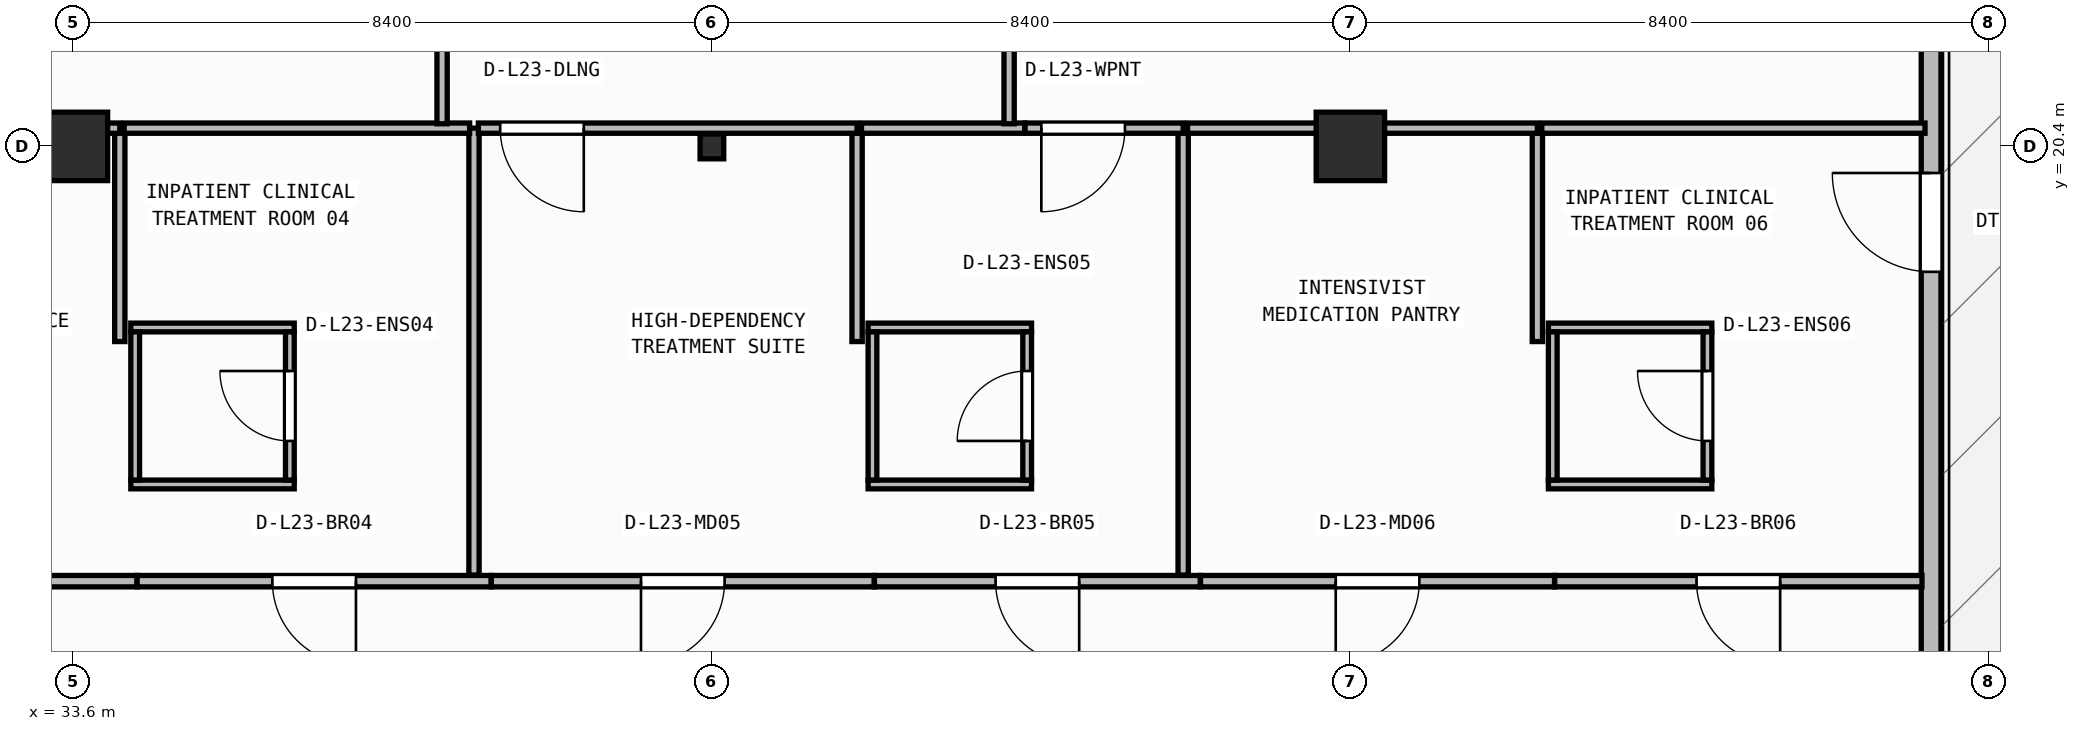
"""IFC4 building model, lengths in metres.
Left out: names, types, materials, properties, quantities, classifications, styles, units other than length and angle.
Written with IfcOpenShell. Run it as: python <this file> out.ifc"""

import sys

from ifc_helpers import new_model, si_unit, direction, frame, frame_2d, origin, origin_2d, place, context, subcontext, project, spatial, rectangle, i_section, extrude, element, fill, save


model = new_model("IFC4")
c1 = context("Model", 3, precision=1e-05, world=origin(), true_north=direction((0.0, 1.0)))
c2 = subcontext(c1, "Body", "Model", "MODEL_VIEW")
j1 = project(units=[si_unit("LENGTHUNIT", "METRE"), si_unit("PLANEANGLEUNIT", "RADIAN")], contexts=[c1])
p1 = place(None, origin())
s1 = spatial("IfcSite", under=j1, at=p1, CompositionType="ELEMENT")
p2 = place(p1, origin())
s2 = spatial("IfcBuilding", under=s1, at=p2, CompositionType="ELEMENT")
p3 = place(p2, frame((0.0, 0.0, 93.6)))
s3 = spatial("IfcBuildingStorey", under=s2, at=p3, CompositionType="ELEMENT", Elevation=93.6)
p4 = place(p3, frame((33.6, 20.4, 0.0), z_axis=(0.0, 0.0, 1.0), x_axis=(1.0, 0.0, 0.0)))
e1 = element("IfcColumn", 1, at=p4, inside=s3, PredefinedType="COLUMN", context=c2, shape_type="SweptSolid", body=[
    extrude(rectangle(XDim=0.9, YDim=0.9, at=origin_2d()), origin(), (0.0, 0.0, 1.0), 3.95),
])
p5 = place(p3, frame((42.0, 20.4, 0.0), z_axis=(0.0, 0.0, 1.0), x_axis=(1.0, 0.0, 0.0)))
e2 = element("IfcColumn", 2, at=p5, inside=s3, PredefinedType="COLUMN", context=c2, shape_type="SweptSolid", body=[
    extrude(i_section(OverallWidth=0.311, OverallDepth=0.327, WebThickness=0.016, FlangeThickness=0.025, FilletRadius=0.017, at=origin_2d()), origin(), (0.0, 0.0, 1.0), 3.95),
])
p6 = place(p3, frame((50.4, 20.4, 0.0), z_axis=(0.0, 0.0, 1.0), x_axis=(1.0, 0.0, 0.0)))
e3 = element("IfcColumn", 3, at=p6, inside=s3, PredefinedType="COLUMN", context=c2, shape_type="SweptSolid", body=[
    extrude(rectangle(XDim=0.9, YDim=0.9, at=origin_2d()), origin(), (0.0, 0.0, 1.0), 3.95),
])
p7 = place(p3, frame((58.04, 7.16, 0.0), z_axis=(0.0, 0.0, 1.0), x_axis=(0.0, 1.0, 0.0)))
e4 = element("IfcWall", 4, at=p7, inside=s3, PredefinedType="STANDARD", context=c2, shape_type="SweptSolid", body=[
    extrude(rectangle(XDim=24.48, YDim=0.26, at=frame_2d((12.24, 0.0))), origin(), (0.0, 0.0, 1.0), 3.67),
])
p8 = place(p7, frame((11.59, 0.0, 0.0)))
e5 = element("IfcOpeningElement", 5, at=p8, cuts=e4, PredefinedType="OPENING", context=c2, shape_type="SweptSolid", body=[
    extrude(rectangle(XDim=1.3, YDim=2.15, at=frame_2d((0.65, 1.075))), frame((0.0, 0.14, 0.0), z_axis=(0.0, -1.0, 0.0), x_axis=(1.0, 0.0, 0.0)), (0.0, 0.0, 1.0), 0.28),
])
p9 = place(p3, frame((34.355, 15.952, 0.0), z_axis=(0.0, 0.0, 1.0), x_axis=(1.0, 0.0, 0.0)))
e6 = element("IfcWall", 6, at=p9, inside=s3, PredefinedType="PARTITIONING", context=c2, shape_type="SweptSolid", body=[
    extrude(rectangle(XDim=2.15, YDim=0.115, at=frame_2d((1.075, 0.0))), origin(), (0.0, 0.0, 1.0), 3.438),
])
p10 = place(p3, frame((34.355, 18.018, 0.0), z_axis=(0.0, 0.0, 1.0), x_axis=(1.0, 0.0, 0.0)))
e7 = element("IfcWall", 7, at=p10, inside=s3, PredefinedType="PARTITIONING", context=c2, shape_type="SweptSolid", body=[
    extrude(rectangle(XDim=2.15, YDim=0.115, at=frame_2d((1.075, 0.0))), origin(), (0.0, 0.0, 1.0), 3.67),
])
p11 = place(p3, frame((34.413, 16.01, 0.0), z_axis=(0.0, 0.0, 1.0), x_axis=(0.0, 1.0, 0.0)))
e8 = element("IfcWall", 8, at=p11, inside=s3, PredefinedType="PARTITIONING", context=c2, shape_type="SweptSolid", body=[
    extrude(rectangle(XDim=1.95, YDim=0.115, at=frame_2d((0.975, 0.0))), origin(), (0.0, 0.0, 1.0), 3.67),
])
p12 = place(p3, frame((36.448, 16.01, 0.0), z_axis=(0.0, 0.0, 1.0), x_axis=(0.0, 1.0, 0.0)))
e9 = element("IfcWall", 9, at=p12, inside=s3, PredefinedType="PARTITIONING", context=c2, shape_type="SweptSolid", body=[
    extrude(rectangle(XDim=1.95, YDim=0.115, at=frame_2d((0.975, 0.0))), origin(), (0.0, 0.0, 1.0), 3.67),
])
p13 = place(p12, frame((0.515, 0.0, 0.0)))
e10 = element("IfcOpeningElement", 10, at=p13, cuts=e9, PredefinedType="OPENING", context=c2, shape_type="SweptSolid", body=[
    extrude(rectangle(XDim=0.92, YDim=2.1, at=frame_2d((0.46, 1.05))), frame((0.0, 0.067, 0.0), z_axis=(0.0, -1.0, 0.0), x_axis=(1.0, 0.0, 0.0)), (0.0, 0.0, 1.0), 0.135),
])
p14 = place(p3, frame((44.055, 15.952, 0.0), z_axis=(0.0, 0.0, 1.0), x_axis=(1.0, 0.0, 0.0)))
e11 = element("IfcWall", 11, at=p14, inside=s3, PredefinedType="PARTITIONING", context=c2, shape_type="SweptSolid", body=[
    extrude(rectangle(XDim=2.15, YDim=0.115, at=frame_2d((1.075, 0.0))), origin(), (0.0, 0.0, 1.0), 3.438),
])
p15 = place(p3, frame((44.055, 18.018, 0.0), z_axis=(0.0, 0.0, 1.0), x_axis=(1.0, 0.0, 0.0)))
e12 = element("IfcWall", 12, at=p15, inside=s3, PredefinedType="PARTITIONING", context=c2, shape_type="SweptSolid", body=[
    extrude(rectangle(XDim=2.15, YDim=0.115, at=frame_2d((1.075, 0.0))), origin(), (0.0, 0.0, 1.0), 3.67),
])
p16 = place(p3, frame((44.113, 16.01, 0.0), z_axis=(0.0, 0.0, 1.0), x_axis=(0.0, 1.0, 0.0)))
e13 = element("IfcWall", 13, at=p16, inside=s3, PredefinedType="PARTITIONING", context=c2, shape_type="SweptSolid", body=[
    extrude(rectangle(XDim=1.95, YDim=0.115, at=frame_2d((0.975, 0.0))), origin(), (0.0, 0.0, 1.0), 3.67),
])
p17 = place(p3, frame((46.147, 16.01, 0.0), z_axis=(0.0, 0.0, 1.0), x_axis=(0.0, 1.0, 0.0)))
e14 = element("IfcWall", 14, at=p17, inside=s3, PredefinedType="PARTITIONING", context=c2, shape_type="SweptSolid", body=[
    extrude(rectangle(XDim=1.95, YDim=0.115, at=frame_2d((0.975, 0.0))), origin(), (0.0, 0.0, 1.0), 3.67),
])
p18 = place(p17, frame((0.515, 0.0, 0.0)))
e15 = element("IfcOpeningElement", 15, at=p18, cuts=e14, PredefinedType="OPENING", context=c2, shape_type="SweptSolid", body=[
    extrude(rectangle(XDim=0.92, YDim=2.1, at=frame_2d((0.46, 1.05))), frame((0.0, 0.067, 0.0), z_axis=(0.0, -1.0, 0.0), x_axis=(1.0, 0.0, 0.0)), (0.0, 0.0, 1.0), 0.135),
])
for number, where, z_axis, x_axis in (
    (16, (53.005, 15.952, 0.0), (0.0, 0.0, 1.0), (1.0, 0.0, 0.0)),
    (17, (53.005, 18.018, 0.0), (0.0, 0.0, 1.0), (1.0, 0.0, 0.0)),
):
    element("IfcWall", number, at=place(p3, frame(where, z_axis=z_axis, x_axis=x_axis)), inside=s3, PredefinedType="PARTITIONING", context=c2, shape_type="SweptSolid", body=[
        extrude(rectangle(XDim=2.15, YDim=0.115, at=frame_2d((1.075, 0.0))), origin(), (0.0, 0.0, 1.0), 3.67),
    ])
p19 = place(p3, frame((53.062, 16.01, 0.0), z_axis=(0.0, 0.0, 1.0), x_axis=(0.0, 1.0, 0.0)))
e18 = element("IfcWall", 18, at=p19, inside=s3, PredefinedType="PARTITIONING", context=c2, shape_type="SweptSolid", body=[
    extrude(rectangle(XDim=1.95, YDim=0.115, at=frame_2d((0.975, 0.0))), origin(), (0.0, 0.0, 1.0), 3.67),
])
p20 = place(p3, frame((55.097, 16.01, 0.0), z_axis=(0.0, 0.0, 1.0), x_axis=(0.0, 1.0, 0.0)))
e19 = element("IfcWall", 19, at=p20, inside=s3, PredefinedType="PARTITIONING", context=c2, shape_type="SweptSolid", body=[
    extrude(rectangle(XDim=1.95, YDim=0.115, at=frame_2d((0.975, 0.0))), origin(), (0.0, 0.0, 1.0), 3.67),
])
p21 = place(p20, frame((0.515, 0.0, 0.0)))
e20 = element("IfcOpeningElement", 20, at=p21, cuts=e19, PredefinedType="OPENING", context=c2, shape_type="SweptSolid", body=[
    extrude(rectangle(XDim=0.92, YDim=2.1, at=frame_2d((0.46, 1.05))), frame((0.0, 0.067, 0.0), z_axis=(0.0, -1.0, 0.0), x_axis=(1.0, 0.0, 0.0)), (0.0, 0.0, 1.0), 0.135),
])
p22 = place(p3, frame((34.436, 14.68, 0.0), z_axis=(0.0, 0.0, 1.0), x_axis=(-1.0, 0.0, 0.0)))
e21 = element("IfcWall", 21, at=p22, inside=s3, PredefinedType="PARTITIONING", context=c2, shape_type="SweptSolid", body=[
    extrude(rectangle(XDim=4.682, YDim=0.15, at=frame_2d((2.341, 0.0))), origin(), (0.0, 0.0, 1.0), 3.67),
])
p23 = place(p22, frame((1.791, 0.0, 0.0)))
e22 = element("IfcOpeningElement", 22, at=p23, cuts=e21, PredefinedType="OPENING", context=c2, shape_type="SweptSolid", body=[
    extrude(rectangle(XDim=1.1, YDim=2.1, at=frame_2d((0.55, 1.05))), frame((0.0, 0.085, 0.0), z_axis=(0.0, -1.0, 0.0), x_axis=(1.0, 0.0, 0.0)), (0.0, 0.0, 1.0), 0.17),
])
p24 = place(p3, frame((39.096, 14.68, 0.0), z_axis=(0.0, 0.0, 1.0), x_axis=(-1.0, 0.0, 0.0)))
e23 = element("IfcWall", 23, at=p24, inside=s3, PredefinedType="PARTITIONING", context=c2, shape_type="SweptSolid", body=[
    extrude(rectangle(XDim=4.658, YDim=0.15, at=frame_2d((2.329, 0.0))), origin(), (0.0, 0.0, 1.0), 3.67),
])
p25 = place(p24, frame((1.779, 0.0, 0.0)))
e24 = element("IfcOpeningElement", 24, at=p25, cuts=e23, PredefinedType="OPENING", context=c2, shape_type="SweptSolid", body=[
    extrude(rectangle(XDim=1.1, YDim=2.1, at=frame_2d((0.55, 1.05))), frame((0.0, 0.085, 0.0), z_axis=(0.0, -1.0, 0.0), x_axis=(1.0, 0.0, 0.0)), (0.0, 0.0, 1.0), 0.17),
])
p26 = place(p3, frame((44.136, 14.68, 0.0), z_axis=(0.0, 0.0, 1.0), x_axis=(-1.0, 0.0, 0.0)))
e25 = element("IfcWall", 25, at=p26, inside=s3, PredefinedType="PARTITIONING", context=c2, shape_type="SweptSolid", body=[
    extrude(rectangle(XDim=5.038, YDim=0.15, at=frame_2d((2.519, 0.0))), origin(), (0.0, 0.0, 1.0), 3.67),
])
p27 = place(p26, frame((1.969, 0.0, 0.0)))
e26 = element("IfcOpeningElement", 26, at=p27, cuts=e25, PredefinedType="OPENING", context=c2, shape_type="SweptSolid", body=[
    extrude(rectangle(XDim=1.1, YDim=2.1, at=frame_2d((0.55, 1.05))), frame((0.0, 0.085, 0.0), z_axis=(0.0, -1.0, 0.0), x_axis=(1.0, 0.0, 0.0)), (0.0, 0.0, 1.0), 0.17),
])
p28 = place(p3, frame((48.426, 14.68, 0.0), z_axis=(0.0, 0.0, 1.0), x_axis=(-1.0, 0.0, 0.0)))
e27 = element("IfcWall", 27, at=p28, inside=s3, PredefinedType="PARTITIONING", context=c2, shape_type="SweptSolid", body=[
    extrude(rectangle(XDim=4.288, YDim=0.15, at=frame_2d((2.144, 0.0))), origin(), (0.0, 0.0, 1.0), 3.67),
])
p29 = place(p28, frame((1.594, 0.0, 0.0)))
e28 = element("IfcOpeningElement", 28, at=p29, cuts=e27, PredefinedType="OPENING", context=c2, shape_type="SweptSolid", body=[
    extrude(rectangle(XDim=1.1, YDim=2.1, at=frame_2d((0.55, 1.05))), frame((0.0, 0.085, 0.0), z_axis=(0.0, -1.0, 0.0), x_axis=(1.0, 0.0, 0.0)), (0.0, 0.0, 1.0), 0.17),
])
p30 = place(p3, frame((53.086, 14.68, 0.0), z_axis=(0.0, 0.0, 1.0), x_axis=(-1.0, 0.0, 0.0)))
e29 = element("IfcWall", 29, at=p30, inside=s3, PredefinedType="PARTITIONING", context=c2, shape_type="SweptSolid", body=[
    extrude(rectangle(XDim=4.658, YDim=0.15, at=frame_2d((2.329, 0.0))), origin(), (0.0, 0.0, 1.0), 3.67),
])
p31 = place(p30, frame((1.779, 0.0, 0.0)))
e30 = element("IfcOpeningElement", 30, at=p31, cuts=e29, PredefinedType="OPENING", context=c2, shape_type="SweptSolid", body=[
    extrude(rectangle(XDim=1.1, YDim=2.1, at=frame_2d((0.55, 1.05))), frame((0.0, 0.085, 0.0), z_axis=(0.0, -1.0, 0.0), x_axis=(1.0, 0.0, 0.0)), (0.0, 0.0, 1.0), 0.17),
])
p32 = place(p3, frame((57.92, 14.68, 0.0), z_axis=(0.0, 0.0, 1.0), x_axis=(-1.0, 0.0, 0.0)))
e31 = element("IfcWall", 31, at=p32, inside=s3, PredefinedType="PARTITIONING", context=c2, shape_type="SweptSolid", body=[
    extrude(rectangle(XDim=4.832, YDim=0.15, at=frame_2d((2.416, 0.0))), origin(), (0.0, 0.0, 1.0), 3.67),
])
p33 = place(p32, frame((1.866, 0.0, 0.0)))
e32 = element("IfcOpeningElement", 32, at=p33, cuts=e31, PredefinedType="OPENING", context=c2, shape_type="SweptSolid", body=[
    extrude(rectangle(XDim=1.1, YDim=2.1, at=frame_2d((0.55, 1.05))), frame((0.0, 0.085, 0.0), z_axis=(0.0, -1.0, 0.0), x_axis=(1.0, 0.0, 0.0)), (0.0, 0.0, 1.0), 0.17),
])
p34 = place(p3, frame((34.21, 17.833, 0.0), z_axis=(0.0, 0.0, 1.0), x_axis=(0.0, 1.0, 0.0)))
e33 = element("IfcWall", 33, at=p34, inside=s3, PredefinedType="PARTITIONING", context=c2, shape_type="SweptSolid", body=[
    extrude(rectangle(XDim=2.807, YDim=0.135, at=frame_2d((1.404, 0.0))), origin(), (0.0, 0.0, 1.0), 3.67),
])
p35 = place(p3, frame((34.21, 20.64, 0.0), z_axis=(0.0, 0.0, 1.0), x_axis=(-1.0, 0.0, 0.0)))
e34 = element("IfcWall", 34, at=p35, inside=s3, PredefinedType="PARTITIONING", context=c2, shape_type="SweptSolid", body=[
    extrude(rectangle(XDim=4.245, YDim=0.135, at=frame_2d((2.123, 0.0))), origin(), (0.0, 0.0, 1.0), 3.033),
])
p36 = place(p3, frame((38.87, 14.76, 0.0), z_axis=(0.0, 0.0, 1.0), x_axis=(0.0, 1.0, 0.0)))
e35 = element("IfcWall", 35, at=p36, inside=s3, PredefinedType="PARTITIONING", context=c2, shape_type="SweptSolid", body=[
    extrude(rectangle(XDim=5.88, YDim=0.135, at=frame_2d((2.94, 0.0))), origin(), (0.0, 0.0, 1.0), 3.67),
])
p37 = place(p3, frame((38.812, 20.64, 0.0), z_axis=(0.0, 0.0, 1.0), x_axis=(-1.0, 0.0, 0.0)))
e36 = element("IfcWall", 36, at=p37, inside=s3, PredefinedType="PARTITIONING", context=c2, shape_type="SweptSolid", body=[
    extrude(rectangle(XDim=4.545, YDim=0.135, at=frame_2d((2.272, 0.0))), origin(), (0.0, 0.0, 1.0), 3.033),
])
p38 = place(p3, frame((43.91, 17.833, 0.0), z_axis=(0.0, 0.0, 1.0), x_axis=(0.0, 1.0, 0.0)))
e37 = element("IfcWall", 37, at=p38, inside=s3, PredefinedType="PARTITIONING", context=c2, shape_type="SweptSolid", body=[
    extrude(rectangle(XDim=2.807, YDim=0.135, at=frame_2d((1.404, 0.0))), origin(), (0.0, 0.0, 1.0), 3.67),
])
p39 = place(p3, frame((43.91, 20.64, 0.0), z_axis=(0.0, 0.0, 1.0), x_axis=(-1.0, 0.0, 0.0)))
e38 = element("IfcWall", 38, at=p39, inside=s3, PredefinedType="PARTITIONING", context=c2, shape_type="SweptSolid", body=[
    extrude(rectangle(XDim=4.982, YDim=0.135, at=frame_2d((2.491, 0.0))), origin(), (0.0, 0.0, 1.0), 3.033),
])
p40 = place(p39, frame((3.595, 0.0, 0.0)))
e39 = element("IfcOpeningElement", 39, at=p40, cuts=e38, PredefinedType="OPENING", context=c2, shape_type="SweptSolid", body=[
    extrude(rectangle(XDim=1.1, YDim=2.1, at=frame_2d((0.55, 1.05))), frame((0.0, 0.077, 0.0), z_axis=(0.0, -1.0, 0.0), x_axis=(1.0, 0.0, 0.0)), (0.0, 0.0, 1.0), 0.155),
])
p41 = place(p3, frame((48.2, 14.76, 0.0), z_axis=(0.0, 0.0, 1.0), x_axis=(0.0, 1.0, 0.0)))
e40 = element("IfcWall", 40, at=p41, inside=s3, PredefinedType="PARTITIONING", context=c2, shape_type="SweptSolid", body=[
    extrude(rectangle(XDim=5.88, YDim=0.135, at=frame_2d((2.94, 0.0))), origin(), (0.0, 0.0, 1.0), 3.67),
])
p42 = place(p3, frame((46.117, 20.64, 0.0), z_axis=(0.0, 0.0, 1.0), x_axis=(-1.0, 0.0, 0.0)))
e41 = element("IfcWall", 41, at=p42, inside=s3, PredefinedType="PARTITIONING", context=c2, shape_type="SweptSolid", body=[
    extrude(rectangle(XDim=2.15, YDim=0.135, at=frame_2d((1.075, 0.0))), origin(), (0.0, 0.0, 1.0), 3.033),
])
p43 = place(p3, frame((48.2, 20.64, 0.0), z_axis=(0.0, 0.0, 1.0), x_axis=(-1.0, 0.0, 0.0)))
e42 = element("IfcWall", 42, at=p43, inside=s3, PredefinedType="PARTITIONING", context=c2, shape_type="SweptSolid", body=[
    extrude(rectangle(XDim=2.081, YDim=0.135, at=frame_2d((1.04, 0.0))), origin(), (0.0, 0.0, 1.0), 3.033),
])
p44 = place(p43, frame((0.766, 0.0, 0.0)))
e43 = element("IfcOpeningElement", 43, at=p44, cuts=e42, PredefinedType="OPENING", context=c2, shape_type="SweptSolid", body=[
    extrude(rectangle(XDim=1.1, YDim=2.1, at=frame_2d((0.55, 1.05))), frame((0.0, 0.077, 0.0), z_axis=(0.0, -1.0, 0.0), x_axis=(1.0, 0.0, 0.0)), (0.0, 0.0, 1.0), 0.155),
])
p45 = place(p3, frame((52.86, 17.833, 0.0), z_axis=(0.0, 0.0, 1.0), x_axis=(0.0, 1.0, 0.0)))
e44 = element("IfcWall", 44, at=p45, inside=s3, PredefinedType="PARTITIONING", context=c2, shape_type="SweptSolid", body=[
    extrude(rectangle(XDim=2.807, YDim=0.135, at=frame_2d((1.404, 0.0))), origin(), (0.0, 0.0, 1.0), 3.67),
])
p46 = place(p3, frame((52.86, 20.64, 0.0), z_axis=(0.0, 0.0, 1.0), x_axis=(-1.0, 0.0, 0.0)))
e45 = element("IfcWall", 45, at=p46, inside=s3, PredefinedType="PARTITIONING", context=c2, shape_type="SweptSolid", body=[
    extrude(rectangle(XDim=4.603, YDim=0.135, at=frame_2d((2.301, 0.0))), origin(), (0.0, 0.0, 1.0), 3.033),
])
p47 = place(p3, frame((57.96, 20.64, 0.0), z_axis=(0.0, 0.0, 1.0), x_axis=(-1.0, 0.0, 0.0)))
e46 = element("IfcWall", 46, at=p47, inside=s3, PredefinedType="PARTITIONING", context=c2, shape_type="SweptSolid", body=[
    extrude(rectangle(XDim=5.042, YDim=0.135, at=frame_2d((2.521, 0.0))), origin(), (0.0, 0.0, 1.0), 3.67),
])
for number, where, z_axis, x_axis in (
    (47, (38.45, 20.698, 0.0), (0.0, 0.0, 1.0), (0.0, 1.0, 0.0)),
    (48, (45.91, 20.698, 0.0), (0.0, 0.0, 1.0), (0.0, 1.0, 0.0)),
):
    element("IfcWall", number, at=place(p3, frame(where, z_axis=z_axis, x_axis=x_axis)), inside=s3, PredefinedType="PARTITIONING", context=c2, shape_type="SweptSolid", body=[
        extrude(rectangle(XDim=6.442, YDim=0.135, at=frame_2d((3.221, 0.0))), origin(), (0.0, 0.0, 1.0), 3.67),
    ])
p48 = place(p8, origin())
e49 = element("IfcDoor", 49, at=p48, inside=s3, OperationType="SINGLE_SWING_RIGHT", PredefinedType="DOOR", context=c2, shape_type="SweptSolid", body=[
    extrude(rectangle(XDim=1.3, YDim=2.15, at=frame_2d((0.65, 1.075))), frame((0.0, 0.025, 0.0), z_axis=(0.0, -1.0, 0.0), x_axis=(1.0, 0.0, 0.0)), (0.0, 0.0, 1.0), 0.05),
])
fill(e5, e49)
p49 = place(p13, origin())
e50 = element("IfcDoor", 50, at=p49, inside=s3, OperationType="SINGLE_SWING_RIGHT", PredefinedType="DOOR", context=c2, shape_type="SweptSolid", body=[
    extrude(rectangle(XDim=0.92, YDim=2.1, at=frame_2d((0.46, 1.05))), frame((0.0, 0.025, 0.0), z_axis=(0.0, -1.0, 0.0), x_axis=(1.0, 0.0, 0.0)), (0.0, 0.0, 1.0), 0.05),
])
fill(e10, e50)
p50 = place(p18, origin())
e51 = element("IfcDoor", 51, at=p50, inside=s3, OperationType="SINGLE_SWING_LEFT", PredefinedType="DOOR", context=c2, shape_type="SweptSolid", body=[
    extrude(rectangle(XDim=0.92, YDim=2.1, at=frame_2d((0.46, 1.05))), frame((0.0, 0.025, 0.0), z_axis=(0.0, -1.0, 0.0), x_axis=(1.0, 0.0, 0.0)), (0.0, 0.0, 1.0), 0.05),
])
fill(e15, e51)
p51 = place(p21, origin())
e52 = element("IfcDoor", 52, at=p51, inside=s3, OperationType="SINGLE_SWING_RIGHT", PredefinedType="DOOR", context=c2, shape_type="SweptSolid", body=[
    extrude(rectangle(XDim=0.92, YDim=2.1, at=frame_2d((0.46, 1.05))), frame((0.0, 0.025, 0.0), z_axis=(0.0, -1.0, 0.0), x_axis=(1.0, 0.0, 0.0)), (0.0, 0.0, 1.0), 0.05),
])
fill(e20, e52)
p52 = place(p25, origin())
e53 = element("IfcDoor", 53, at=p52, inside=s3, OperationType="SINGLE_SWING_LEFT", PredefinedType="DOOR", context=c2, shape_type="SweptSolid", body=[
    extrude(rectangle(XDim=1.1, YDim=2.1, at=frame_2d((0.55, 1.05))), frame((0.0, 0.025, 0.0), z_axis=(0.0, -1.0, 0.0), x_axis=(1.0, 0.0, 0.0)), (0.0, 0.0, 1.0), 0.05),
])
fill(e24, e53)
p53 = place(p27, origin())
e54 = element("IfcDoor", 54, at=p53, inside=s3, OperationType="SINGLE_SWING_RIGHT", PredefinedType="DOOR", context=c2, shape_type="SweptSolid", body=[
    extrude(rectangle(XDim=1.1, YDim=2.1, at=frame_2d((0.55, 1.05))), frame((0.0, 0.025, 0.0), z_axis=(0.0, -1.0, 0.0), x_axis=(1.0, 0.0, 0.0)), (0.0, 0.0, 1.0), 0.05),
])
fill(e26, e54)
p54 = place(p29, origin())
e55 = element("IfcDoor", 55, at=p54, inside=s3, OperationType="SINGLE_SWING_LEFT", PredefinedType="DOOR", context=c2, shape_type="SweptSolid", body=[
    extrude(rectangle(XDim=1.1, YDim=2.1, at=frame_2d((0.55, 1.05))), frame((0.0, 0.025, 0.0), z_axis=(0.0, -1.0, 0.0), x_axis=(1.0, 0.0, 0.0)), (0.0, 0.0, 1.0), 0.05),
])
fill(e28, e55)
p55 = place(p31, origin())
e56 = element("IfcDoor", 56, at=p55, inside=s3, OperationType="SINGLE_SWING_RIGHT", PredefinedType="DOOR", context=c2, shape_type="SweptSolid", body=[
    extrude(rectangle(XDim=1.1, YDim=2.1, at=frame_2d((0.55, 1.05))), frame((0.0, 0.025, 0.0), z_axis=(0.0, -1.0, 0.0), x_axis=(1.0, 0.0, 0.0)), (0.0, 0.0, 1.0), 0.05),
])
fill(e30, e56)
p56 = place(p33, origin())
e57 = element("IfcDoor", 57, at=p56, inside=s3, OperationType="SINGLE_SWING_LEFT", PredefinedType="DOOR", context=c2, shape_type="SweptSolid", body=[
    extrude(rectangle(XDim=1.1, YDim=2.1, at=frame_2d((0.55, 1.05))), frame((0.0, 0.025, 0.0), z_axis=(0.0, -1.0, 0.0), x_axis=(1.0, 0.0, 0.0)), (0.0, 0.0, 1.0), 0.05),
])
fill(e32, e57)
p57 = place(p40, origin())
e58 = element("IfcDoor", 58, at=p57, inside=s3, OperationType="SINGLE_SWING_LEFT", PredefinedType="DOOR", context=c2, shape_type="SweptSolid", body=[
    extrude(rectangle(XDim=1.1, YDim=2.1, at=frame_2d((0.55, 1.05))), frame((0.0, 0.025, 0.0), z_axis=(0.0, -1.0, 0.0), x_axis=(1.0, 0.0, 0.0)), (0.0, 0.0, 1.0), 0.05),
])
fill(e39, e58)
p58 = place(p44, origin())
e59 = element("IfcDoor", 59, at=p58, inside=s3, OperationType="SINGLE_SWING_RIGHT", PredefinedType="DOOR", context=c2, shape_type="SweptSolid", body=[
    extrude(rectangle(XDim=1.1, YDim=2.1, at=frame_2d((0.55, 1.05))), frame((0.0, 0.025, 0.0), z_axis=(0.0, -1.0, 0.0), x_axis=(1.0, 0.0, 0.0)), (0.0, 0.0, 1.0), 0.05),
])
fill(e43, e59)
save(model, sys.argv[1])
